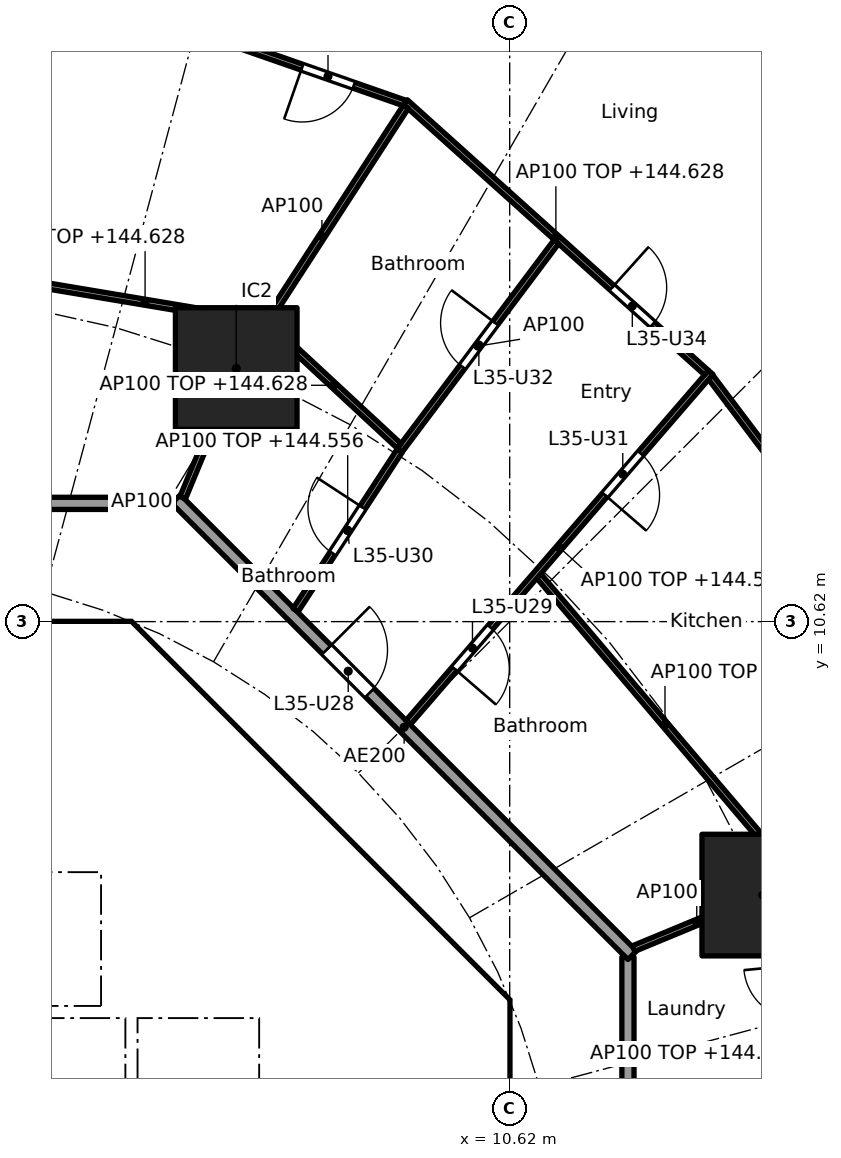
"""IFC4 building model, lengths in metres.
Left out: names, types, materials, properties, quantities, classifications, styles, units other than length and angle.
Written with IfcOpenShell. Run it as: python <this file> out.ifc"""

import sys

from ifc_helpers import new_model, si_unit, direction, frame, frame_2d, origin, origin_2d, place, context, subcontext, project, spatial, polyline, rectangle, outline, extrude, element, fill, save


model = new_model("IFC4")
c1 = context("Model", 3, precision=1e-05, world=origin(), true_north=direction((0.0, 1.0)))
c2 = subcontext(c1, "Body", "Model", "MODEL_VIEW")
j1 = project(units=[si_unit("LENGTHUNIT", "METRE"), si_unit("PLANEANGLEUNIT", "RADIAN")], contexts=[c1])
p1 = place(None, origin())
s1 = spatial("IfcSite", under=j1, at=p1, CompositionType="ELEMENT")
p2 = place(p1, origin())
s2 = spatial("IfcBuilding", under=s1, at=p2, CompositionType="ELEMENT")
p3 = place(p2, frame((0.0, 0.0, 141.8)))
s3 = spatial("IfcBuildingStorey", under=s2, at=p3, CompositionType="ELEMENT", Elevation=141.8)
for number, where, z_axis, x_axis in (
    (1, (14.782, 6.123, 0.0), (0.0, 0.0, 1.0), (1.0, 0.0, 0.0)),
    (2, (6.123, 14.782, 0.0), (0.0, 0.0, 1.0), (1.0, 0.0, 0.0)),
):
    element("IfcColumn", number, at=place(p3, frame(where, z_axis=z_axis, x_axis=x_axis)), inside=s3, PredefinedType="COLUMN", context=c2, shape_type="SweptSolid", body=[
        extrude(rectangle(XDim=2.0, YDim=2.0, at=origin_2d()), origin(), (0.0, 0.0, 1.0), 3.7),
    ])
p4 = place(p3, frame((14.265, 20.749, 0.0), z_axis=(0.0, 0.0, 1.0), x_axis=(0.70789728551, -0.706315392135, 0.0)))
e3 = element("IfcWall", 3, at=p4, inside=s3, PredefinedType="SOLIDWALL", context=c2, shape_type="SweptSolid", body=[
    extrude(rectangle(XDim=3.087, YDim=0.25, at=frame_2d((1.543, 0.0))), origin(), (0.0, 0.0, 1.0), 3.44),
])
p5 = place(p4, frame((0.493, 0.0, 0.0)))
e4 = element("IfcOpeningElement", 4, at=p5, cuts=e3, PredefinedType="OPENING", context=c2, shape_type="SweptSolid", body=[
    extrude(rectangle(XDim=2.1, YDim=2.4, at=frame_2d((1.05, 1.2))), frame((0.0, 0.135, 0.0), z_axis=(0.0, -1.0, 0.0), x_axis=(1.0, 0.0, 0.0)), (0.0, 0.0, 1.0), 0.27),
])
p6 = place(p3, frame((9.988, 4.613, 0.0), z_axis=(0.0, 0.0, 1.0), x_axis=(-0.707106781187, 0.707106781187, 0.0)))
e5 = element("IfcWall", 5, at=p6, inside=s3, PredefinedType="SHEAR", context=c2, shape_type="SweptSolid", body=[
    extrude(rectangle(XDim=7.602, YDim=0.6, at=frame_2d((3.801, 0.0))), origin(), (0.0, 0.0, 1.0), 3.44),
])
p7 = place(p6, frame((3.201, 0.0, 0.0)))
e6 = element("IfcOpeningElement", 6, at=p7, cuts=e5, PredefinedType="OPENING", context=c2, shape_type="SweptSolid", body=[
    extrude(rectangle(XDim=1.2, YDim=2.1, at=frame_2d((0.6, 1.05))), frame((0.0, 0.31, 0.0), z_axis=(0.0, -1.0, 0.0), x_axis=(1.0, 0.0, 0.0)), (0.0, 0.0, 1.0), 0.62),
])
p8 = place(p3, frame((4.0, 4.3, 0.0), z_axis=(0.0, 0.0, 1.0), x_axis=(0.0, 1.0, 0.0)))
e7 = element("IfcWall", 7, at=p8, inside=s3, PredefinedType="SOLIDWALL", context=c2, shape_type="SweptSolid", body=[
    extrude(rectangle(XDim=2.2, YDim=0.2, at=frame_2d((1.1, 0.0))), origin(), (0.0, 0.0, 1.0), 3.44),
])
p9 = place(p8, frame((0.55, 0.0, 0.0)))
e8 = element("IfcOpeningElement", 8, at=p9, cuts=e7, PredefinedType="OPENING", context=c2, shape_type="SweptSolid", body=[
    extrude(rectangle(XDim=1.1, YDim=2.1, at=frame_2d((0.55, 1.05))), frame((0.0, 0.11, 0.0), z_axis=(0.0, -1.0, 0.0), x_axis=(1.0, 0.0, 0.0)), (0.0, 0.0, 1.0), 0.22),
])
p10 = place(p3, frame((6.7, 4.0, 0.0), z_axis=(0.0, 0.0, 1.0), x_axis=(1.0, 0.0, 0.0)))
e9 = element("IfcWall", 9, at=p10, inside=s3, PredefinedType="SOLIDWALL", context=c2, shape_type="SweptSolid", body=[
    extrude(rectangle(XDim=3.325, YDim=0.2, at=frame_2d((1.662, 0.0))), origin(), (0.0, 0.0, 1.0), 3.44),
])
p11 = place(p10, frame((1.25, 0.0, 0.0)))
e10 = element("IfcOpeningElement", 10, at=p11, cuts=e9, PredefinedType="OPENING", context=c2, shape_type="SweptSolid", body=[
    extrude(rectangle(XDim=1.1, YDim=2.1, at=frame_2d((0.55, 1.05))), frame((0.0, 0.11, 0.0), z_axis=(0.0, -1.0, 0.0), x_axis=(1.0, 0.0, 0.0)), (0.0, 0.0, 1.0), 0.22),
])
p12 = place(p3, frame((4.0, 7.025, 0.0), z_axis=(0.0, 0.0, 1.0), x_axis=(0.0, 1.0, 0.0)))
e11 = element("IfcWall", 11, at=p12, inside=s3, PredefinedType="SOLIDWALL", context=c2, shape_type="SweptSolid", body=[
    extrude(rectangle(XDim=3.0, YDim=0.2, at=frame_2d((1.5, 0.0))), origin(), (0.0, 0.0, 1.0), 3.44),
])
p13 = place(p12, frame((0.925, 0.0, 0.0)))
e12 = element("IfcOpeningElement", 12, at=p13, cuts=e11, PredefinedType="OPENING", context=c2, shape_type="SweptSolid", body=[
    extrude(rectangle(XDim=1.1, YDim=2.1, at=frame_2d((0.55, 1.05))), frame((0.0, 0.11, 0.0), z_axis=(0.0, -1.0, 0.0), x_axis=(1.0, 0.0, 0.0)), (0.0, 0.0, 1.0), 0.22),
])
p14 = place(p3, origin())
e13 = element("IfcWall", 13, at=p14, inside=s3, PredefinedType="SHEAR", context=c2, shape_type="SweptSolid", body=[
    extrude(outline(polyline([(-4.152, 10.025), (-4.401, 9.776), (-4.825, 10.2), (-4.401, 10.625), (4.401, 10.625), (4.825, 10.2), (4.401, 9.776), (4.152, 10.025), (-4.152, 10.025)])), origin(), (0.0, 0.0, 1.0), 3.44),
])
p15 = place(p3, origin())
e14 = element("IfcWall", 14, at=p15, inside=s3, PredefinedType="SHEAR", context=c2, shape_type="SweptSolid", body=[
    extrude(outline(polyline([(9.776, -4.401), (10.025, -4.152), (10.025, -3.801), (10.025, 4.152), (9.776, 4.401), (10.2, 4.825), (10.625, 4.401), (10.625, -4.401), (10.2, -4.825), (9.776, -4.401)])), origin(), (0.0, 0.0, 1.0), 3.44),
])
p16 = place(p3, origin())
e15 = element("IfcWall", 15, at=p16, inside=s3, PredefinedType="SOLIDWALL", context=c2, shape_type="SweptSolid", body=[
    extrude(outline(polyline([(-6.5, 2.1), (-6.7, 2.1), (-6.7, 4.3), (6.7, 4.3), (6.7, 2.1), (6.5, 2.1), (6.5, 4.1), (4.5, 4.1), (4.5, 2.1), (4.3, 2.1), (4.3, 4.1), (2.3, 4.1), (2.3, 2.1), (2.1, 2.1), (2.1, 4.1), (0.1, 4.1), (0.1, 2.1), (-0.1, 2.1), (-0.1, 4.1), (-2.1, 4.1), (-2.1, 2.1), (-2.3, 2.1), (-2.3, 4.1), (-4.3, 4.1), (-4.3, 2.1), (-4.5, 2.1), (-4.5, 4.1), (-6.5, 4.1), (-6.5, 2.1)])), origin(), (0.0, 0.0, 1.0), 3.44),
])
p17 = place(p3, origin())
e16 = element("IfcWall", 16, at=p17, inside=s3, PredefinedType="SOLIDWALL", context=c2, shape_type="SweptSolid", body=[
    extrude(outline(polyline([(4.1, 6.5), (-4.1, 6.5), (-4.1, 7.025), (4.1, 7.025), (4.1, 6.5)])), origin(), (0.0, 0.0, 1.0), 3.44),
])
p18 = place(p3, origin())
e17 = element("IfcWall", 17, at=p18, inside=s3, PredefinedType="SOLIDWALL", context=c2, shape_type="SweptSolid", body=[
    extrude(outline(polyline([(7.025, -3.9), (6.7, -3.9), (6.7, 3.9), (7.025, 3.9), (7.025, -3.9)])), origin(), (0.0, 0.0, 1.0), 3.44),
])
p19 = place(p3, frame((12.565, -5.104, 0.0), z_axis=(0.0, 0.0, 1.0), x_axis=(0.0, 1.0, 0.0)))
e18 = element("IfcWall", 18, at=p19, inside=s3, PredefinedType="PARTITIONING", context=c2, shape_type="SweptSolid", body=[
    extrude(rectangle(XDim=10.209, YDim=0.2, at=frame_2d((5.104, 0.0))), origin(), (0.0, 0.0, 1.0), 3.44),
])
p20 = place(p3, frame((12.635, 5.134, 0.0), z_axis=(0.0, 0.0, 1.0), x_axis=(-0.707106781187, 0.707106781187, 0.0)))
e19 = element("IfcWall", 19, at=p20, inside=s3, PredefinedType="PARTITIONING", context=c2, shape_type="SweptSolid", body=[
    extrude(rectangle(XDim=10.609, YDim=0.2, at=frame_2d((5.305, 0.0))), origin(), (0.0, 0.0, 1.0), 3.44),
])
p21 = place(p20, frame((6.106, 0.0, 0.0)))
e20 = element("IfcOpeningElement", 20, at=p21, cuts=e19, PredefinedType="OPENING", context=c2, shape_type="SweptSolid", body=[
    extrude(rectangle(XDim=1.0, YDim=2.1, at=frame_2d((0.5, 1.05))), frame((0.0, 0.11, 0.0), z_axis=(0.0, -1.0, 0.0), x_axis=(1.0, 0.0, 0.0)), (0.0, 0.0, 1.0), 0.22),
])
p22 = place(p3, frame((5.104, 12.565, 0.0), z_axis=(0.0, 0.0, 1.0), x_axis=(-1.0, 0.0, 0.0)))
e21 = element("IfcWall", 21, at=p22, inside=s3, PredefinedType="PARTITIONING", context=c2, shape_type="SweptSolid", body=[
    extrude(rectangle(XDim=10.409, YDim=0.2, at=frame_2d((5.205, 0.0))), origin(), (0.0, 0.0, 1.0), 3.44),
])
p23 = place(p3, frame((12.661, 1.76, 0.0), z_axis=(0.0, 0.0, 1.0), x_axis=(0.967120304949, 0.254319318488, 0.0)))
e22 = element("IfcWall", 22, at=p23, inside=s3, PredefinedType="PARTITIONING", context=c2, shape_type="SweptSolid", body=[
    extrude(rectangle(XDim=10.499, YDim=0.1, at=frame_2d((5.25, 0.0))), origin(), (0.0, 0.0, 1.0), 2.756),
])
p24 = place(p23, frame((4.634, 0.0, 0.0)))
e23 = element("IfcOpeningElement", 23, at=p24, cuts=e22, PredefinedType="OPENING", context=c2, shape_type="SweptSolid", body=[
    extrude(rectangle(XDim=0.9, YDim=2.1, at=frame_2d((0.45, 1.05))), frame((0.0, 0.06, 0.0), z_axis=(0.0, -1.0, 0.0), x_axis=(1.0, 0.0, 0.0)), (0.0, 0.0, 1.0), 0.12),
])
p25 = place(p23, frame((1.073, 0.0, 0.0)))
e24 = element("IfcOpeningElement", 24, at=p25, cuts=e22, PredefinedType="OPENING", context=c2, shape_type="SweptSolid", body=[
    extrude(rectangle(XDim=0.9, YDim=2.1, at=frame_2d((0.45, 1.05))), frame((0.0, 0.06, 0.0), z_axis=(0.0, -1.0, 0.0), x_axis=(1.0, 0.0, 0.0)), (0.0, 0.0, 1.0), 0.12),
])
p26 = place(p3, frame((12.657, 5.243, 0.0), z_axis=(0.0, 0.0, 1.0), x_axis=(0.923864733477, 0.382719158442, 0.0)))
e25 = element("IfcWall", 25, at=p26, inside=s3, PredefinedType="PARTITIONING", context=c2, shape_type="SweptSolid", body=[
    extrude(rectangle(XDim=2.25, YDim=0.1, at=frame_2d((1.125, 0.0))), origin(), (0.0, 0.0, 1.0), 3.44),
])
p27 = place(p3, frame((15.25, 6.483, 0.0), z_axis=(0.0, 0.0, 1.0), x_axis=(-0.647379829894, 0.762167537912, 0.0)))
e26 = element("IfcWall", 26, at=p27, inside=s3, PredefinedType="PARTITIONING", context=c2, shape_type="SweptSolid", body=[
    extrude(rectangle(XDim=6.413, YDim=0.1, at=frame_2d((3.206, 0.0))), origin(), (0.0, 0.0, 1.0), 2.828),
])
p28 = place(p3, frame((18.106, 9.098, 0.0), z_axis=(0.0, 0.0, 1.0), x_axis=(-0.602393803621, 0.798199038686, 0.0)))
e27 = element("IfcWall", 27, at=p28, inside=s3, PredefinedType="PARTITIONING", context=c2, shape_type="SweptSolid", body=[
    extrude(rectangle(XDim=6.944, YDim=0.1, at=frame_2d((3.472, 0.0))), origin(), (0.0, 0.0, 1.0), 2.828),
])
p29 = place(p3, frame((8.95, 8.96, 0.0), z_axis=(0.0, 0.0, 1.0), x_axis=(0.653829477183, 0.756641932995, 0.0)))
e28 = element("IfcWall", 28, at=p29, inside=s3, PredefinedType="PARTITIONING", context=c2, shape_type="SweptSolid", body=[
    extrude(rectangle(XDim=7.611, YDim=0.1, at=frame_2d((3.805, 0.0))), origin(), (0.0, 0.0, 1.0), 2.756),
])
p30 = place(p29, frame((1.168, 0.0, 0.0)))
e29 = element("IfcOpeningElement", 29, at=p30, cuts=e28, PredefinedType="OPENING", context=c2, shape_type="SweptSolid", body=[
    extrude(rectangle(XDim=0.9, YDim=2.1, at=frame_2d((0.45, 1.05))), frame((0.0, 0.06, 0.0), z_axis=(0.0, -1.0, 0.0), x_axis=(1.0, 0.0, 0.0)), (0.0, 0.0, 1.0), 0.12),
])
p31 = place(p29, frame((4.948, 0.0, 0.0)))
e30 = element("IfcOpeningElement", 30, at=p31, cuts=e28, PredefinedType="OPENING", context=c2, shape_type="SweptSolid", body=[
    extrude(rectangle(XDim=0.9, YDim=2.1, at=frame_2d((0.45, 1.05))), frame((0.0, 0.06, 0.0), z_axis=(0.0, -1.0, 0.0), x_axis=(1.0, 0.0, 0.0)), (0.0, 0.0, 1.0), 0.12),
])
p32 = place(p3, frame((13.856, 14.714, 0.0), z_axis=(0.0, 0.0, 1.0), x_axis=(-0.743793479211, 0.668409500444, 0.0)))
e31 = element("IfcWall", 31, at=p32, inside=s3, PredefinedType="PARTITIONING", context=c2, shape_type="SweptSolid", body=[
    extrude(rectangle(XDim=6.659, YDim=0.1, at=frame_2d((3.329, 0.0))), origin(), (0.0, 0.0, 1.0), 2.828),
])
p33 = place(p32, frame((1.19, 0.0, 0.0)))
e32 = element("IfcOpeningElement", 32, at=p33, cuts=e31, PredefinedType="OPENING", context=c2, shape_type="SweptSolid", body=[
    extrude(rectangle(XDim=0.9, YDim=2.1, at=frame_2d((0.45, 1.05))), frame((0.0, 0.06, 0.0), z_axis=(0.0, -1.0, 0.0), x_axis=(1.0, 0.0, 0.0)), (0.0, 0.0, 1.0), 0.12),
])
p34 = place(p3, frame((7.099, 10.808, 0.0), z_axis=(0.0, 0.0, 1.0), x_axis=(0.546709757921, 0.837322184463, 0.0)))
e33 = element("IfcWall", 33, at=p34, inside=s3, PredefinedType="PARTITIONING", context=c2, shape_type="SweptSolid", body=[
    extrude(rectangle(XDim=3.134, YDim=0.1, at=frame_2d((1.567, 0.0))), origin(), (0.0, 0.0, 1.0), 2.756),
])
p35 = place(p34, frame((1.117, 0.0, 0.0)))
e34 = element("IfcOpeningElement", 34, at=p35, cuts=e33, PredefinedType="OPENING", context=c2, shape_type="SweptSolid", body=[
    extrude(rectangle(XDim=0.9, YDim=2.1, at=frame_2d((0.45, 1.05))), frame((0.0, 0.06, 0.0), z_axis=(0.0, -1.0, 0.0), x_axis=(1.0, 0.0, 0.0)), (0.0, 0.0, 1.0), 0.12),
])
p36 = place(p3, frame((8.81, 13.434, 0.0), z_axis=(0.0, 0.0, 1.0), x_axis=(0.600491337497, 0.799631261014, 0.0)))
e35 = element("IfcWall", 35, at=p36, inside=s3, PredefinedType="PARTITIONING", context=c2, shape_type="SweptSolid", body=[
    extrude(rectangle(XDim=4.292, YDim=0.1, at=frame_2d((2.146, 0.0))), origin(), (0.0, 0.0, 1.0), 3.44),
])
p37 = place(p36, frame((1.721, 0.0, 0.0)))
e36 = element("IfcOpeningElement", 36, at=p37, cuts=e35, PredefinedType="OPENING", context=c2, shape_type="SweptSolid", body=[
    extrude(rectangle(XDim=0.9, YDim=2.1, at=frame_2d((0.45, 1.05))), frame((0.0, 0.06, 0.0), z_axis=(0.0, -1.0, 0.0), x_axis=(1.0, 0.0, 0.0)), (0.0, 0.0, 1.0), 0.12),
])
p38 = place(p3, frame((8.803, 13.508, 0.0), z_axis=(0.0, 0.0, 1.0), x_axis=(-0.733130973758, 0.680087476224, 0.0)))
e37 = element("IfcWall", 37, at=p38, inside=s3, PredefinedType="PARTITIONING", context=c2, shape_type="SweptSolid", body=[
    extrude(rectangle(XDim=2.937, YDim=0.1, at=frame_2d((1.468, 0.0))), origin(), (0.0, 0.0, 1.0), 2.828),
])
p39 = place(p3, frame((5.243, 12.657, 0.0), z_axis=(0.0, 0.0, 1.0), x_axis=(0.382703272338, 0.923871314276, 0.0)))
e38 = element("IfcWall", 38, at=p39, inside=s3, PredefinedType="PARTITIONING", context=c2, shape_type="SweptSolid", body=[
    extrude(rectangle(XDim=2.249, YDim=0.1, at=frame_2d((1.125, 0.0))), origin(), (0.0, 0.0, 1.0), 3.44),
])
p40 = place(p3, frame((6.15, 14.824, 0.0), z_axis=(0.0, 0.0, 1.0), x_axis=(0.543711280797, 0.839272329542, 0.0)))
e39 = element("IfcWall", 39, at=p40, inside=s3, PredefinedType="PARTITIONING", context=c2, shape_type="SweptSolid", body=[
    extrude(rectangle(XDim=5.083, YDim=0.1, at=frame_2d((2.541, 0.0))), origin(), (0.0, 0.0, 1.0), 3.44),
])
p41 = place(p3, frame((6.564, 15.547, 0.0), z_axis=(0.0, 0.0, 1.0), x_axis=(-0.986269521186, 0.165143669511, 0.0)))
e40 = element("IfcWall", 40, at=p41, inside=s3, PredefinedType="PARTITIONING", context=c2, shape_type="SweptSolid", body=[
    extrude(rectangle(XDim=3.934, YDim=0.1, at=frame_2d((1.967, 0.0))), origin(), (0.0, 0.0, 1.0), 2.828),
])
p42 = place(p3, frame((8.894, 19.148, 0.0), z_axis=(0.0, 0.0, 1.0), x_axis=(-0.944182005381, 0.329424256414, 0.0)))
e41 = element("IfcWall", 41, at=p42, inside=s3, PredefinedType="PARTITIONING", context=c2, shape_type="SweptSolid", body=[
    extrude(rectangle(XDim=5.344, YDim=0.1, at=frame_2d((2.672, 0.0))), origin(), (0.0, 0.0, 1.0), 2.828),
])
p43 = place(p42, frame((0.886, 0.0, 0.0)))
e42 = element("IfcOpeningElement", 42, at=p43, cuts=e41, PredefinedType="OPENING", context=c2, shape_type="SweptSolid", body=[
    extrude(rectangle(XDim=0.9, YDim=2.1, at=frame_2d((0.45, 1.05))), frame((0.0, 0.06, 0.0), z_axis=(0.0, -1.0, 0.0), x_axis=(1.0, 0.0, 0.0)), (0.0, 0.0, 1.0), 0.12),
])
p44 = place(p5, origin())
e43 = element("IfcDoor", 43, at=p44, inside=s3, OperationType="SLIDING_TO_LEFT", PredefinedType="DOOR", context=c2, shape_type="SweptSolid", body=[
    extrude(rectangle(XDim=2.1, YDim=2.4, at=frame_2d((1.05, 1.2))), frame((0.0, 0.025, 0.0), z_axis=(0.0, -1.0, 0.0), x_axis=(1.0, 0.0, 0.0)), (0.0, 0.0, 1.0), 0.05),
])
fill(e4, e43)
p45 = place(p9, origin())
e44 = element("IfcDoor", 44, at=p45, inside=s3, OperationType="DOUBLE_DOOR_SLIDING", PredefinedType="DOOR", context=c2, shape_type="SweptSolid", body=[
    extrude(rectangle(XDim=1.1, YDim=2.1, at=frame_2d((0.55, 1.05))), frame((0.0, 0.025, 0.0), z_axis=(0.0, -1.0, 0.0), x_axis=(1.0, 0.0, 0.0)), (0.0, 0.0, 1.0), 0.05),
])
fill(e8, e44)
p46 = place(p11, frame((1.1, 0.0, 0.0), x_axis=(-1.0, 0.0, 0.0)))
e45 = element("IfcDoor", 45, at=p46, inside=s3, OperationType="SINGLE_SWING_RIGHT", PredefinedType="DOOR", context=c2, shape_type="SweptSolid", body=[
    extrude(rectangle(XDim=1.1, YDim=2.1, at=frame_2d((0.55, 1.05))), frame((0.0, 0.025, 0.0), z_axis=(0.0, -1.0, 0.0), x_axis=(1.0, 0.0, 0.0)), (0.0, 0.0, 1.0), 0.05),
])
fill(e10, e45)
p47 = place(p13, origin())
e46 = element("IfcDoor", 46, at=p47, inside=s3, OperationType="SINGLE_SWING_LEFT", PredefinedType="DOOR", context=c2, shape_type="SweptSolid", body=[
    extrude(rectangle(XDim=1.1, YDim=2.1, at=frame_2d((0.55, 1.05))), frame((0.0, 0.025, 0.0), z_axis=(0.0, -1.0, 0.0), x_axis=(1.0, 0.0, 0.0)), (0.0, 0.0, 1.0), 0.05),
])
fill(e12, e46)
p48 = place(p7, origin())
e47 = element("IfcDoor", 47, at=p48, inside=s3, OperationType="SINGLE_SWING_RIGHT", PredefinedType="DOOR", context=c2, shape_type="SweptSolid", body=[
    extrude(rectangle(XDim=1.2, YDim=2.1, at=frame_2d((0.6, 1.05))), frame((0.0, 0.025, 0.0), z_axis=(0.0, -1.0, 0.0), x_axis=(1.0, 0.0, 0.0)), (0.0, 0.0, 1.0), 0.05),
])
fill(e6, e47)
p49 = place(p21, frame((1.0, 0.0, 0.0), x_axis=(-1.0, 0.0, 0.0)))
e48 = element("IfcDoor", 48, at=p49, inside=s3, OperationType="SINGLE_SWING_LEFT", PredefinedType="DOOR", context=c2, shape_type="SweptSolid", body=[
    extrude(rectangle(XDim=1.0, YDim=2.1, at=frame_2d((0.5, 1.05))), frame((0.0, 0.025, 0.0), z_axis=(0.0, -1.0, 0.0), x_axis=(1.0, 0.0, 0.0)), (0.0, 0.0, 1.0), 0.05),
])
fill(e20, e48)
p50 = place(p30, frame((0.9, 0.0, 0.0), x_axis=(-1.0, 0.0, 0.0)))
e49 = element("IfcDoor", 49, at=p50, inside=s3, OperationType="SINGLE_SWING_RIGHT", PredefinedType="DOOR", context=c2, shape_type="SweptSolid", body=[
    extrude(rectangle(XDim=0.9, YDim=2.1, at=frame_2d((0.45, 1.05))), frame((0.0, 0.025, 0.0), z_axis=(0.0, -1.0, 0.0), x_axis=(1.0, 0.0, 0.0)), (0.0, 0.0, 1.0), 0.05),
])
fill(e29, e49)
p51 = place(p35, origin())
e50 = element("IfcDoor", 50, at=p51, inside=s3, OperationType="SINGLE_SWING_RIGHT", PredefinedType="DOOR", context=c2, shape_type="SweptSolid", body=[
    extrude(rectangle(XDim=0.9, YDim=2.1, at=frame_2d((0.45, 1.05))), frame((0.0, 0.025, 0.0), z_axis=(0.0, -1.0, 0.0), x_axis=(1.0, 0.0, 0.0)), (0.0, 0.0, 1.0), 0.05),
])
fill(e34, e50)
p52 = place(p31, frame((0.9, 0.0, 0.0), x_axis=(-1.0, 0.0, 0.0)))
e51 = element("IfcDoor", 51, at=p52, inside=s3, OperationType="SINGLE_SWING_RIGHT", PredefinedType="DOOR", context=c2, shape_type="SweptSolid", body=[
    extrude(rectangle(XDim=0.9, YDim=2.1, at=frame_2d((0.45, 1.05))), frame((0.0, 0.025, 0.0), z_axis=(0.0, -1.0, 0.0), x_axis=(1.0, 0.0, 0.0)), (0.0, 0.0, 1.0), 0.05),
])
fill(e30, e51)
p53 = place(p37, origin())
e52 = element("IfcDoor", 52, at=p53, inside=s3, OperationType="SINGLE_SWING_RIGHT", PredefinedType="DOOR", context=c2, shape_type="SweptSolid", body=[
    extrude(rectangle(XDim=0.9, YDim=2.1, at=frame_2d((0.45, 1.05))), frame((0.0, 0.025, 0.0), z_axis=(0.0, -1.0, 0.0), x_axis=(1.0, 0.0, 0.0)), (0.0, 0.0, 1.0), 0.05),
])
fill(e36, e52)
p54 = place(p33, frame((0.9, 0.0, 0.0), x_axis=(-1.0, 0.0, 0.0)))
e53 = element("IfcDoor", 53, at=p54, inside=s3, OperationType="SINGLE_SWING_LEFT", PredefinedType="DOOR", context=c2, shape_type="SweptSolid", body=[
    extrude(rectangle(XDim=0.9, YDim=2.1, at=frame_2d((0.45, 1.05))), frame((0.0, 0.025, 0.0), z_axis=(0.0, -1.0, 0.0), x_axis=(1.0, 0.0, 0.0)), (0.0, 0.0, 1.0), 0.05),
])
fill(e32, e53)
p55 = place(p43, origin())
e54 = element("IfcDoor", 54, at=p55, inside=s3, OperationType="SINGLE_SWING_RIGHT", PredefinedType="DOOR", context=c2, shape_type="SweptSolid", body=[
    extrude(rectangle(XDim=0.9, YDim=2.1, at=frame_2d((0.45, 1.05))), frame((0.0, 0.025, 0.0), z_axis=(0.0, -1.0, 0.0), x_axis=(1.0, 0.0, 0.0)), (0.0, 0.0, 1.0), 0.05),
])
fill(e42, e54)
save(model, sys.argv[1])
